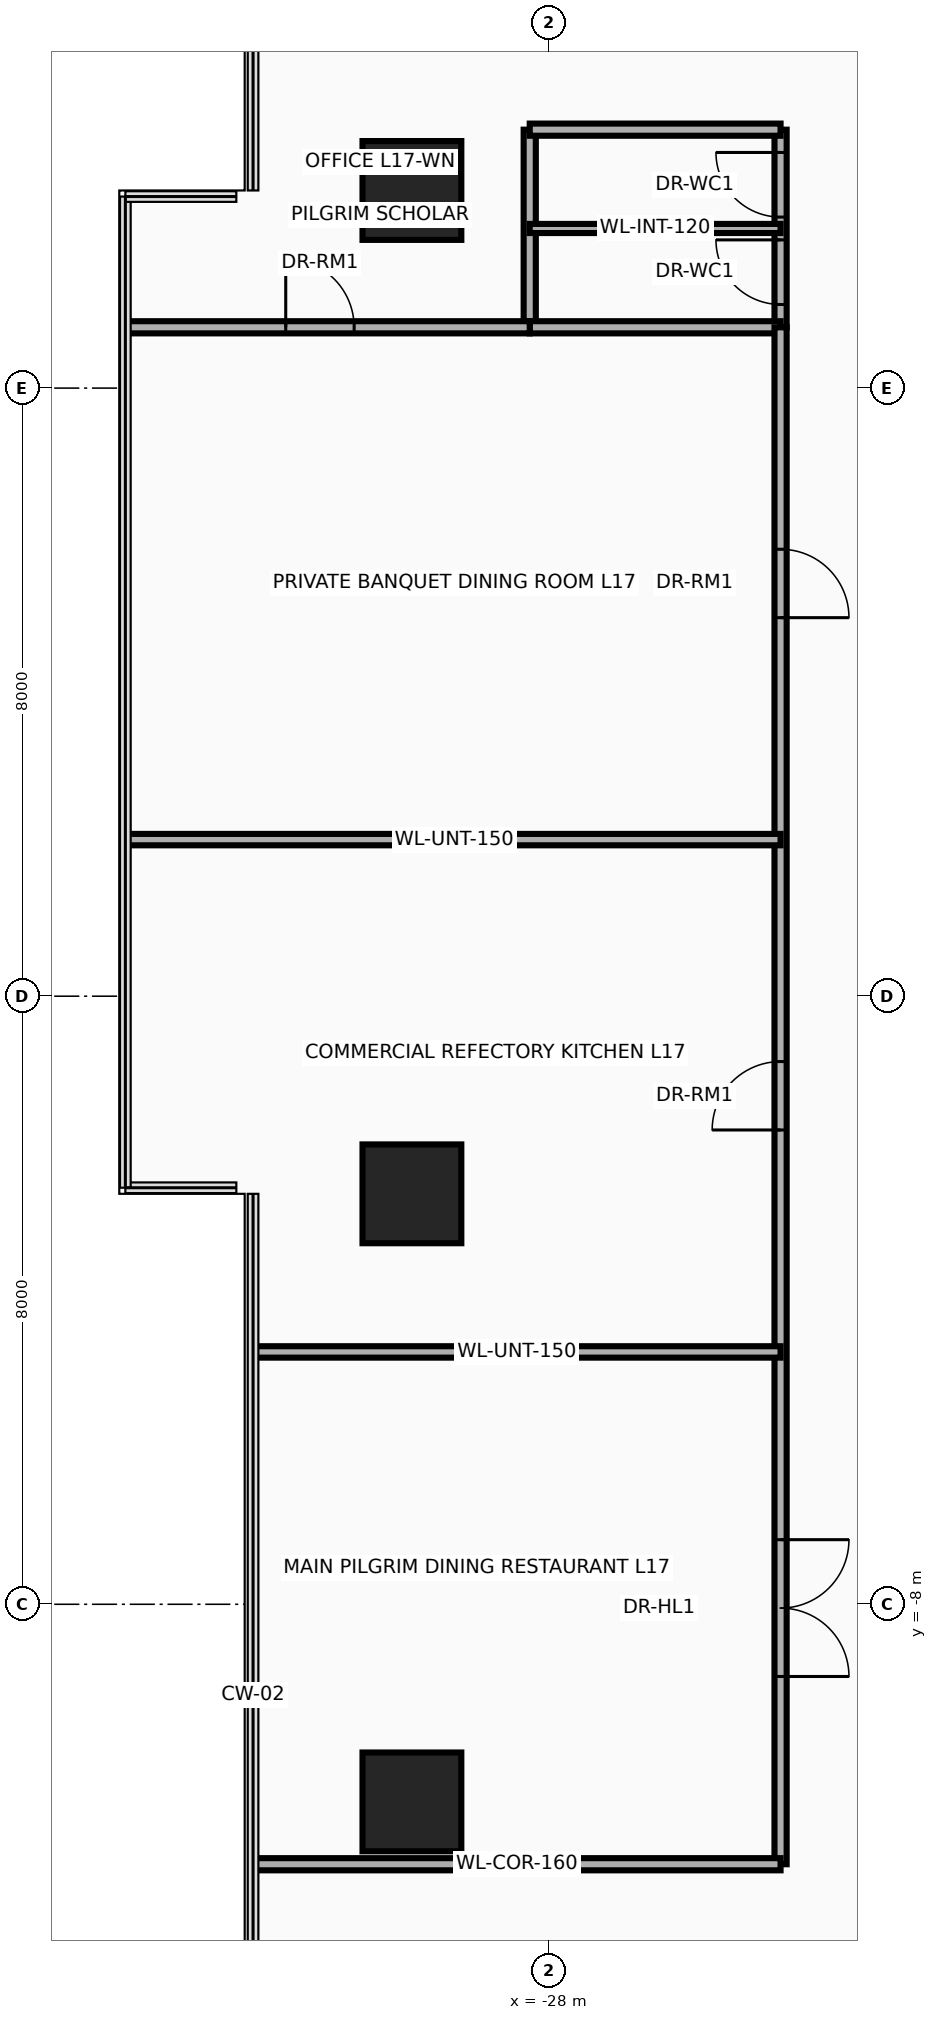
"""IFC4 building model, lengths in metres.
Left out: names, types, materials, properties, quantities, classifications, styles, units other than length and angle.
Written with IfcOpenShell. Run it as: python <this file> out.ifc"""

import sys

from ifc_helpers import new_model, si_unit, direction, frame, frame_2d, origin, origin_2d, place, context, subcontext, project, spatial, rectangle, circle, extrude, source, transform, mapped, element, fill, save


model = new_model("IFC4")
c1 = context("Model", 3, precision=1e-05, world=origin(), true_north=direction((0.0, 1.0)))
c2 = subcontext(c1, "Body", "Model", "MODEL_VIEW")
j1 = project(units=[si_unit("LENGTHUNIT", "METRE"), si_unit("PLANEANGLEUNIT", "RADIAN")], contexts=[c1])
p1 = place(None, origin())
s1 = spatial("IfcSite", under=j1, at=p1, CompositionType="ELEMENT")
p2 = place(p1, origin())
s2 = spatial("IfcBuilding", under=s1, at=p2, CompositionType="ELEMENT")
p3 = place(p2, frame((0.0, 0.0, 70.4)))
s3 = spatial("IfcBuildingStorey", under=s2, at=p3, CompositionType="ELEMENT", Elevation=70.4)
m1 = source(origin(), c2, "Body", "SweptSolid", [
    extrude(circle(Radius=0.65, at=origin_2d()), origin(), (0.0, 0.0, 1.0), 3.7),
])
for number, where, z_axis, x_axis in (
    (1, (-29.8, -10.6, 0.0), (0.0, 0.0, 1.0), (1.0, 0.0, 0.0)),
    (2, (-29.8, -2.6, 0.0), (0.0, 0.0, 1.0), (1.0, 0.0, 0.0)),
    (3, (-29.8, 10.6, 0.0), (0.0, 0.0, 1.0), (1.0, 0.0, 0.0)),
):
    element("IfcColumn", number, at=place(p3, frame(where, z_axis=z_axis, x_axis=x_axis)), inside=s3, PredefinedType="COLUMN", context=c2, shape_type="MappedRepresentation", body=[
        mapped(m1, transform((0.0, 0.0, 0.0), x_axis=(1.0, 0.0, 0.0), y_axis=(0.0, 1.0, 0.0), z_axis=(0.0, 0.0, 1.0), scale=1.0)),
    ])
p4 = place(p3, frame((-28.25, 8.8, 0.0), z_axis=(0.0, 0.0, 1.0), x_axis=(0.0, 1.0, 0.0)))
e4 = element("IfcWall", 4, at=p4, inside=s3, PredefinedType="PARTITIONING", context=c2, shape_type="SweptSolid", body=[
    extrude(rectangle(XDim=2.6, YDim=0.16, at=frame_2d((1.3, 0.0))), origin(), (0.0, 0.0, 1.0), 2.583),
])
p5 = place(p3, frame((-24.95, 8.8, 0.0), z_axis=(0.0, 0.0, 1.0), x_axis=(0.0, 1.0, 0.0)))
e5 = element("IfcWall", 5, at=p5, inside=s3, PredefinedType="PARTITIONING", context=c2, shape_type="SweptSolid", body=[
    extrude(rectangle(XDim=2.6, YDim=0.16, at=frame_2d((1.3, 0.0))), origin(), (0.0, 0.0, 1.0), 2.583),
])
p6 = place(p5, frame((0.3, 0.0, 0.0)))
e6 = element("IfcOpeningElement", 6, at=p6, cuts=e5, PredefinedType="OPENING", context=c2, shape_type="SweptSolid", body=[
    extrude(rectangle(XDim=0.85, YDim=2.1, at=frame_2d((0.425, 1.05))), frame((0.0, 0.095, 0.0), z_axis=(0.0, -1.0, 0.0), x_axis=(1.0, 0.0, 0.0)), (0.0, 0.0, 1.0), 0.19),
])
p7 = place(p5, frame((1.45, 0.0, 0.0)))
e7 = element("IfcOpeningElement", 7, at=p7, cuts=e5, PredefinedType="OPENING", context=c2, shape_type="SweptSolid", body=[
    extrude(rectangle(XDim=0.85, YDim=2.1, at=frame_2d((0.425, 1.05))), frame((0.0, 0.095, 0.0), z_axis=(0.0, -1.0, 0.0), x_axis=(1.0, 0.0, 0.0)), (0.0, 0.0, 1.0), 0.19),
])
for number, where, z_axis, x_axis in (
    (8, (-28.25, 8.8, 0.0), (0.0, 0.0, 1.0), (1.0, 0.0, 0.0)),
    (9, (-28.25, 11.4, 0.0), (0.0, 0.0, 1.0), (1.0, 0.0, 0.0)),
):
    element("IfcWall", number, at=place(p3, frame(where, z_axis=z_axis, x_axis=x_axis)), inside=s3, PredefinedType="PARTITIONING", context=c2, shape_type="SweptSolid", body=[
        extrude(rectangle(XDim=3.3, YDim=0.16, at=frame_2d((1.65, 0.0))), origin(), (0.0, 0.0, 1.0), 3.46),
    ])
p8 = place(p3, frame((-28.25, 10.1, 0.0), z_axis=(0.0, 0.0, 1.0), x_axis=(1.0, 0.0, 0.0)))
e10 = element("IfcWall", 10, at=p8, inside=s3, PredefinedType="PARTITIONING", context=c2, shape_type="SweptSolid", body=[
    extrude(rectangle(XDim=3.3, YDim=0.12, at=frame_2d((1.65, 0.0))), origin(), (0.0, 0.0, 1.0), 3.46),
])
p9 = place(p3, frame((-24.95, -11.42, 0.0), z_axis=(0.0, 0.0, 1.0), x_axis=(0.0, 1.0, 0.0)))
e11 = element("IfcWall", 11, at=p9, inside=s3, PredefinedType="PARTITIONING", context=c2, shape_type="SweptSolid", body=[
    extrude(rectangle(XDim=20.22, YDim=0.16, at=frame_2d((10.11, 0.0))), origin(), (0.0, 0.0, 1.0), 2.583),
])
p10 = place(p9, frame((2.47, 0.0, 0.0)))
e12 = element("IfcOpeningElement", 12, at=p10, cuts=e11, PredefinedType="OPENING", context=c2, shape_type="SweptSolid", body=[
    extrude(rectangle(XDim=1.8, YDim=2.15, at=frame_2d((0.9, 1.075))), frame((0.0, 0.095, 0.0), z_axis=(0.0, -1.0, 0.0), x_axis=(1.0, 0.0, 0.0)), (0.0, 0.0, 1.0), 0.19),
])
p11 = place(p9, frame((9.66, 0.0, 0.0)))
e13 = element("IfcOpeningElement", 13, at=p11, cuts=e11, PredefinedType="OPENING", context=c2, shape_type="SweptSolid", body=[
    extrude(rectangle(XDim=0.9, YDim=2.1, at=frame_2d((0.45, 1.05))), frame((0.0, 0.095, 0.0), z_axis=(0.0, -1.0, 0.0), x_axis=(1.0, 0.0, 0.0)), (0.0, 0.0, 1.0), 0.19),
])
p12 = place(p9, frame((16.4, 0.0, 0.0)))
e14 = element("IfcOpeningElement", 14, at=p12, cuts=e11, PredefinedType="OPENING", context=c2, shape_type="SweptSolid", body=[
    extrude(rectangle(XDim=0.9, YDim=2.1, at=frame_2d((0.45, 1.05))), frame((0.0, 0.095, 0.0), z_axis=(0.0, -1.0, 0.0), x_axis=(1.0, 0.0, 0.0)), (0.0, 0.0, 1.0), 0.19),
])
p13 = place(p3, frame((-33.54, 8.8, 0.0), z_axis=(0.0, 0.0, 1.0), x_axis=(1.0, 0.0, 0.0)))
e15 = element("IfcWall", 15, at=p13, inside=s3, PredefinedType="PARTITIONING", context=c2, shape_type="SweptSolid", body=[
    extrude(rectangle(XDim=5.29, YDim=0.16, at=frame_2d((2.645, 0.0))), origin(), (0.0, 0.0, 1.0), 2.896),
])
p14 = place(p13, frame((2.08, 0.0, 0.0)))
e16 = element("IfcOpeningElement", 16, at=p14, cuts=e15, PredefinedType="OPENING", context=c2, shape_type="SweptSolid", body=[
    extrude(rectangle(XDim=0.9, YDim=2.1, at=frame_2d((0.45, 1.05))), frame((0.0, 0.095, 0.0), z_axis=(0.0, -1.0, 0.0), x_axis=(1.0, 0.0, 0.0)), (0.0, 0.0, 1.0), 0.19),
])
p15 = place(p3, frame((-31.89, -4.68, 0.0), z_axis=(0.0, 0.0, 1.0), x_axis=(1.0, 0.0, 0.0)))
e17 = element("IfcWall", 17, at=p15, inside=s3, PredefinedType="PARTITIONING", context=c2, shape_type="SweptSolid", body=[
    extrude(rectangle(XDim=6.94, YDim=0.15, at=frame_2d((3.47, 0.0))), origin(), (0.0, 0.0, 1.0), 2.896),
])
p16 = place(p3, frame((-33.54, 2.06, 0.0), z_axis=(0.0, 0.0, 1.0), x_axis=(1.0, 0.0, 0.0)))
e18 = element("IfcWall", 18, at=p16, inside=s3, PredefinedType="PARTITIONING", context=c2, shape_type="SweptSolid", body=[
    extrude(rectangle(XDim=8.59, YDim=0.15, at=frame_2d((4.295, 0.0))), origin(), (0.0, 0.0, 1.0), 2.896),
])
p17 = place(p3, frame((-31.89, -11.42, 0.0), z_axis=(0.0, 0.0, 1.0), x_axis=(1.0, 0.0, 0.0)))
e19 = element("IfcWall", 19, at=p17, inside=s3, PredefinedType="PARTITIONING", context=c2, shape_type="SweptSolid", body=[
    extrude(rectangle(XDim=6.94, YDim=0.16, at=frame_2d((3.47, 0.0))), origin(), (0.0, 0.0, 1.0), 3.46),
])
p18 = place(p6, origin())
e20 = element("IfcDoor", 20, at=p18, inside=s3, OperationType="SINGLE_SWING_RIGHT", PredefinedType="DOOR", context=c2, shape_type="SweptSolid", body=[
    extrude(rectangle(XDim=0.85, YDim=2.1, at=frame_2d((0.425, 1.05))), frame((0.0, 0.025, 0.0), z_axis=(0.0, -1.0, 0.0), x_axis=(1.0, 0.0, 0.0)), (0.0, 0.0, 1.0), 0.05),
])
fill(e6, e20)
p19 = place(p7, origin())
e21 = element("IfcDoor", 21, at=p19, inside=s3, OperationType="SINGLE_SWING_LEFT", PredefinedType="DOOR", context=c2, shape_type="SweptSolid", body=[
    extrude(rectangle(XDim=0.85, YDim=2.1, at=frame_2d((0.425, 1.05))), frame((0.0, 0.025, 0.0), z_axis=(0.0, -1.0, 0.0), x_axis=(1.0, 0.0, 0.0)), (0.0, 0.0, 1.0), 0.05),
])
fill(e7, e21)
p20 = place(p14, origin())
e22 = element("IfcDoor", 22, at=p20, inside=s3, OperationType="SINGLE_SWING_RIGHT", PredefinedType="DOOR", context=c2, shape_type="SweptSolid", body=[
    extrude(rectangle(XDim=0.9, YDim=2.1, at=frame_2d((0.45, 1.05))), frame((0.0, 0.025, 0.0), z_axis=(0.0, -1.0, 0.0), x_axis=(1.0, 0.0, 0.0)), (0.0, 0.0, 1.0), 0.05),
])
fill(e16, e22)
p21 = place(p10, frame((1.8, 0.0, 0.0), z_axis=(0.0, 0.0, 1.0), x_axis=(-1.0, 0.0, 0.0)))
e23 = element("IfcDoor", 23, at=p21, inside=s3, OperationType="DOUBLE_DOOR_SINGLE_SWING", PredefinedType="DOOR", context=c2, shape_type="SweptSolid", body=[
    extrude(rectangle(XDim=1.8, YDim=2.15, at=frame_2d((0.9, 1.075))), frame((0.0, 0.025, 0.0), z_axis=(0.0, -1.0, 0.0), x_axis=(1.0, 0.0, 0.0)), (0.0, 0.0, 1.0), 0.05),
])
fill(e12, e23)
p22 = place(p11, origin())
e24 = element("IfcDoor", 24, at=p22, inside=s3, OperationType="SINGLE_SWING_RIGHT", PredefinedType="DOOR", context=c2, shape_type="SweptSolid", body=[
    extrude(rectangle(XDim=0.9, YDim=2.1, at=frame_2d((0.45, 1.05))), frame((0.0, 0.025, 0.0), z_axis=(0.0, -1.0, 0.0), x_axis=(1.0, 0.0, 0.0)), (0.0, 0.0, 1.0), 0.05),
])
fill(e13, e24)
p23 = place(p12, frame((0.9, 0.0, 0.0), z_axis=(0.0, 0.0, 1.0), x_axis=(-1.0, 0.0, 0.0)))
e25 = element("IfcDoor", 25, at=p23, inside=s3, OperationType="SINGLE_SWING_LEFT", PredefinedType="DOOR", context=c2, shape_type="SweptSolid", body=[
    extrude(rectangle(XDim=0.9, YDim=2.1, at=frame_2d((0.45, 1.05))), frame((0.0, 0.025, 0.0), z_axis=(0.0, -1.0, 0.0), x_axis=(1.0, 0.0, 0.0)), (0.0, 0.0, 1.0), 0.05),
])
fill(e14, e25)
save(model, sys.argv[1])
